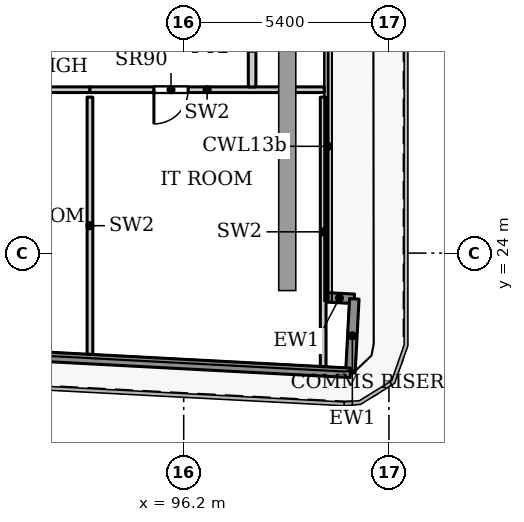
"""IFC4 building model, lengths in metres.
Left out: names, types, materials, properties, quantities, classifications, styles, units other than length and angle.
Written with IfcOpenShell. Run it as: python <this file> out.ifc"""

import sys

from ifc_helpers import new_model, si_unit, direction, frame, frame_2d, origin, place, context, subcontext, project, spatial, rectangle, extrude, source, transform, mapped, element, fill, save


model = new_model("IFC4")
c1 = context("Model", 3, precision=1e-05, world=origin(), true_north=direction((0.0, 1.0)))
c2 = subcontext(c1, "Body", "Model", "MODEL_VIEW")
j1 = project(units=[si_unit("LENGTHUNIT", "METRE"), si_unit("PLANEANGLEUNIT", "RADIAN")], contexts=[c1])
p1 = place(None, origin())
s1 = spatial("IfcSite", under=j1, at=p1, CompositionType="ELEMENT")
p2 = place(p1, origin())
s2 = spatial("IfcBuilding", under=s1, at=p2, CompositionType="ELEMENT")
p3 = place(p2, frame((0.0, 0.0, 69.5)))
s3 = spatial("IfcBuildingStorey", under=s2, at=p3, CompositionType="ELEMENT", Elevation=69.5)
p4 = place(p3, frame((99.907, 22.839, 0.0), z_axis=(0.0, 0.0, 1.0), x_axis=(0.998561284263, -0.053622398031, 0.0)))
e1 = element("IfcWall", 1, at=p4, inside=s3, PredefinedType="SOLIDWALL", context=c2, shape_type="SweptSolid", body=[
    extrude(rectangle(XDim=0.783, YDim=0.25, at=frame_2d((0.392, 0.0))), origin(), (0.0, 0.0, 1.0), 3.75),
])
p5 = place(p3, frame((100.689, 22.797, 0.0), z_axis=(0.0, 0.0, 1.0), x_axis=(-0.052841433274, -0.998602915542, 0.0)))
e2 = element("IfcWall", 2, at=p5, inside=s3, PredefinedType="SOLIDWALL", context=c2, shape_type="SweptSolid", body=[
    extrude(rectangle(XDim=1.95, YDim=0.25, at=frame_2d((0.975, 0.0))), origin(), (0.0, 0.0, 1.0), 3.75),
])
p6 = place(p3, frame((100.586, 20.85, 0.0), z_axis=(0.0, 0.0, 1.0), x_axis=(-0.99861746497, 0.052565755559, 0.0)))
e3 = element("IfcWall", 3, at=p6, inside=s3, PredefinedType="SOLIDWALL", context=c2, shape_type="SweptSolid", body=[
    extrude(rectangle(XDim=66.639, YDim=0.25, at=frame_2d((33.319, 0.0))), origin(), (0.0, 0.0, 1.0), 3.75),
])
p7 = place(p3, frame((89.32, 28.3, 0.0), z_axis=(0.0, 0.0, 1.0), x_axis=(1.0, 0.0, 0.0)))
e4 = element("IfcWall", 4, at=p7, inside=s3, PredefinedType="PARTITIONING", context=c2, shape_type="SweptSolid", body=[
    extrude(rectangle(XDim=4.413, YDim=0.15, at=frame_2d((2.207, 0.0))), origin(), (0.0, 0.0, 1.0), 2.5),
])
p8 = place(p7, frame((1.756, 0.0, 0.0)))
e5 = element("IfcOpeningElement", 5, at=p8, cuts=e4, PredefinedType="OPENING", context=c2, shape_type="SweptSolid", body=[
    extrude(rectangle(XDim=0.9, YDim=2.2, at=frame_2d((0.45, 1.1))), frame((0.0, 0.085, 0.0), z_axis=(0.0, -1.0, 0.0), x_axis=(1.0, 0.0, 0.0)), (0.0, 0.0, 1.0), 0.17),
])
p9 = place(p3, frame((93.733, 21.338, 0.0), z_axis=(0.0, 0.0, 1.0), x_axis=(0.0, 1.0, 0.0)))
e6 = element("IfcWall", 6, at=p9, inside=s3, PredefinedType="PARTITIONING", context=c2, shape_type="SweptSolid", body=[
    extrude(rectangle(XDim=6.767, YDim=0.15, at=frame_2d((3.384, 0.0))), origin(), (0.0, 0.0, 1.0), 3.9),
])
p10 = place(p3, frame((93.733, 28.3, 0.0), z_axis=(0.0, 0.0, 1.0), x_axis=(1.0, 0.0, 0.0)))
e7 = element("IfcWall", 7, at=p10, inside=s3, PredefinedType="PARTITIONING", context=c2, shape_type="SweptSolid", body=[
    extrude(rectangle(XDim=6.165, YDim=0.15, at=frame_2d((3.083, 0.0))), origin(), (0.0, 0.0, 1.0), 3.9),
])
p11 = place(p10, frame((1.683, 0.0, 0.0)))
e8 = element("IfcOpeningElement", 8, at=p11, cuts=e7, PredefinedType="OPENING", context=c2, shape_type="SweptSolid", body=[
    extrude(rectangle(XDim=0.9, YDim=2.2, at=frame_2d((0.45, 1.1))), frame((0.0, 0.085, 0.0), z_axis=(0.0, -1.0, 0.0), x_axis=(1.0, 0.0, 0.0)), (0.0, 0.0, 1.0), 0.17),
])
p12 = place(p3, frame((99.87, 21.015, 0.0), z_axis=(0.0, 0.0, 1.0), x_axis=(0.0, 1.0, 0.0)))
e9 = element("IfcWall", 9, at=p12, inside=s3, PredefinedType="PARTITIONING", context=c2, shape_type="SweptSolid", body=[
    extrude(rectangle(XDim=7.09, YDim=0.15, at=frame_2d((3.545, 0.0))), origin(), (0.0, 0.0, 1.0), 3.9),
])
p13 = place(p3, frame((98.0, 28.374, 0.0), z_axis=(0.0, 0.0, 1.0), x_axis=(0.0, 1.0, 0.0)))
e10 = element("IfcWall", 10, at=p13, inside=s3, PredefinedType="PARTITIONING", context=c2, shape_type="SweptSolid", body=[
    extrude(rectangle(XDim=2.026, YDim=0.2, at=frame_2d((1.013, 0.0))), origin(), (0.0, 0.0, 1.0), 3.6),
])
m1 = source(origin(), c2, "Body", "SweptSolid", [
    extrude(rectangle(XDim=0.9, YDim=2.2, at=frame_2d((0.45, 1.1))), frame((0.0, 0.025, 0.0), z_axis=(0.0, -1.0, 0.0), x_axis=(1.0, 0.0, 0.0)), (0.0, 0.0, 1.0), 0.05),
])
p14 = place(p11, origin())
e11 = element("IfcDoor", 11, at=p14, inside=s3, OperationType="SINGLE_SWING_RIGHT", PredefinedType="DOOR", context=c2, shape_type="MappedRepresentation", body=[
    mapped(m1, transform((0.0, 0.0, 0.0), x_axis=(1.0, 0.0, 0.0), y_axis=(0.0, 1.0, 0.0), z_axis=(0.0, 0.0, 1.0), scale=1.0)),
])
fill(e8, e11)
save(model, sys.argv[1])
